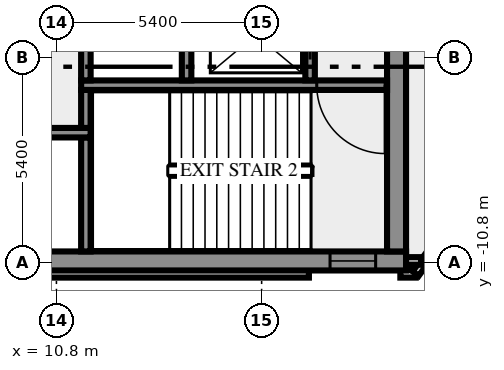
"""IFC4 building model, lengths in metres.
Left out: names, types, materials, properties, quantities, classifications, styles, units other than length and angle.
Written with IfcOpenShell. Run it as: python <this file> out.ifc"""

import sys

from ifc_helpers import new_model, si_unit, direction, frame, frame_2d, origin, place, context, subcontext, project, spatial, rectangle, extrude, element, fill, save


model = new_model("IFC4")
c1 = context("Model", 3, precision=1e-05, world=origin(), true_north=direction((0.0, 1.0)))
c2 = subcontext(c1, "Body", "Model", "MODEL_VIEW")
j1 = project(units=[si_unit("LENGTHUNIT", "METRE"), si_unit("PLANEANGLEUNIT", "RADIAN")], contexts=[c1])
p1 = place(None, origin())
s1 = spatial("IfcSite", under=j1, at=p1, CompositionType="ELEMENT")
p2 = place(p1, origin())
s2 = spatial("IfcBuilding", under=s1, at=p2, CompositionType="ELEMENT")
p3 = place(p2, frame((0.0, 0.0, 71.0)))
s3 = spatial("IfcBuildingStorey", under=s2, at=p3, CompositionType="ELEMENT", Elevation=71.0)
p4 = place(p3, frame((-17.444, -11.088, 0.0), z_axis=(0.0, 0.0, 1.0), x_axis=(1.0, 0.0, 0.0)))
e1 = element("IfcWall", 1, at=p4, inside=s3, PredefinedType="SOLIDWALL", context=c2, shape_type="SweptSolid", body=[
    extrude(rectangle(XDim=34.888, YDim=0.2, at=frame_2d((17.444, 0.0))), origin(), (0.0, 0.0, 1.0), 3.65),
])
p5 = place(p3, frame((19.85, -11.088, 0.0), z_axis=(0.0, 0.0, 1.0), x_axis=(1.0, 0.0, 0.0)))
e2 = element("IfcWall", 2, at=p5, inside=s3, PredefinedType="SOLIDWALL", context=c2, shape_type="SweptSolid", body=[
    extrude(rectangle(XDim=0.406, YDim=0.2, at=frame_2d((0.203, 0.0))), origin(), (0.0, 0.0, 1.0), 3.65),
])
p6 = place(p3, frame((20.253, -11.083, 0.0), z_axis=(0.0, 0.0, 1.0), x_axis=(0.587766567315, 0.809030569476, 0.0)))
e3 = element("IfcWall", 3, at=p6, inside=s3, PredefinedType="SOLIDWALL", context=c2, shape_type="SweptSolid", body=[
    extrude(rectangle(XDim=2.688, YDim=0.2, at=frame_2d((1.344, 0.0))), origin(), (0.0, 0.0, 1.0), 3.65),
])
p7 = place(p3, frame((19.98, -10.75, 0.0), z_axis=(0.0, 0.0, 1.0), x_axis=(1.0, 0.0, 0.0)))
e4 = element("IfcWall", 4, at=p7, inside=s3, PredefinedType="SOLIDWALL", context=c2, shape_type="SweptSolid", body=[
    extrude(rectangle(XDim=0.417, YDim=0.2, at=frame_2d((0.208, 0.0))), origin(), (0.0, 0.0, 1.0), 3.65),
])
p8 = place(p3, frame((-20.0, -10.75, 0.0), z_axis=(0.0, 0.0, 1.0), x_axis=(1.0, 0.0, 0.0)))
e5 = element("IfcWall", 5, at=p8, inside=s3, PredefinedType="SHEAR", context=c2, shape_type="SweptSolid", body=[
    extrude(rectangle(XDim=40.0, YDim=0.5, at=frame_2d((20.0, 0.0))), origin(), (0.0, 0.0, 1.0), 3.65),
])
p9 = place(p8, frame((0.8, 0.0, 1.0)))
e6 = element("IfcOpeningElement", 6, at=p9, cuts=e5, PredefinedType="OPENING", context=c2, shape_type="SweptSolid", body=[
    extrude(rectangle(XDim=1.2, YDim=1.2, at=frame_2d((0.6, 0.6))), frame((0.0, 0.26, 0.0), z_axis=(0.0, -1.0, 0.0), x_axis=(1.0, 0.0, 0.0)), (0.0, 0.0, 1.0), 0.52),
])
p10 = place(p8, frame((38.0, 0.0, 1.0)))
e7 = element("IfcOpeningElement", 7, at=p10, cuts=e5, PredefinedType="OPENING", context=c2, shape_type="SweptSolid", body=[
    extrude(rectangle(XDim=1.2, YDim=1.2, at=frame_2d((0.6, 0.6))), frame((0.0, 0.26, 0.0), z_axis=(0.0, -1.0, 0.0), x_axis=(1.0, 0.0, 0.0)), (0.0, 0.0, 1.0), 0.52),
])
p11 = place(p3, frame((11.575, -10.5, 0.0), z_axis=(0.0, 0.0, 1.0), x_axis=(0.0, 1.0, 0.0)))
e8 = element("IfcWall", 8, at=p11, inside=s3, PredefinedType="SHEAR", context=c2, shape_type="SweptSolid", body=[
    extrude(rectangle(XDim=3.0, YDim=0.25, at=frame_2d((1.5, 0.0))), origin(), (0.0, 0.0, 1.0), 3.65),
])
p12 = place(p3, frame((19.75, -10.5, 0.0), z_axis=(0.0, 0.0, 1.0), x_axis=(0.0, 1.0, 0.0)))
e9 = element("IfcWall", 9, at=p12, inside=s3, PredefinedType="SHEAR", context=c2, shape_type="SweptSolid", body=[
    extrude(rectangle(XDim=8.8, YDim=0.5, at=frame_2d((4.4, 0.0))), origin(), (0.0, 0.0, 1.0), 3.65),
])
p13 = place(p3, frame((11.7, -7.375, 0.0), z_axis=(0.0, 0.0, 1.0), x_axis=(-1.0, 0.0, 0.0)))
e10 = element("IfcWall", 10, at=p13, inside=s3, PredefinedType="SHEAR", context=c2, shape_type="SweptSolid", body=[
    extrude(rectangle(XDim=23.4, YDim=0.25, at=frame_2d((11.7, 0.0))), origin(), (0.0, 0.0, 1.0), 3.65),
])
p14 = place(p13, frame((21.45, 0.0, 0.0)))
e11 = element("IfcOpeningElement", 11, at=p14, cuts=e10, PredefinedType="OPENING", context=c2, shape_type="SweptSolid", body=[
    extrude(rectangle(XDim=1.1, YDim=2.1, at=frame_2d((0.55, 1.05))), frame((0.0, 0.135, 0.0), z_axis=(0.0, -1.0, 0.0), x_axis=(1.0, 0.0, 0.0)), (0.0, 0.0, 1.0), 0.27),
])
p15 = place(p13, frame((18.95, 0.0, 0.0)))
e12 = element("IfcOpeningElement", 12, at=p15, cuts=e10, PredefinedType="OPENING", context=c2, shape_type="SweptSolid", body=[
    extrude(rectangle(XDim=1.1, YDim=2.1, at=frame_2d((0.55, 1.05))), frame((0.0, 0.135, 0.0), z_axis=(0.0, -1.0, 0.0), x_axis=(1.0, 0.0, 0.0)), (0.0, 0.0, 1.0), 0.27),
])
p16 = place(p13, frame((16.45, 0.0, 0.0)))
e13 = element("IfcOpeningElement", 13, at=p16, cuts=e10, PredefinedType="OPENING", context=c2, shape_type="SweptSolid", body=[
    extrude(rectangle(XDim=1.1, YDim=2.1, at=frame_2d((0.55, 1.05))), frame((0.0, 0.135, 0.0), z_axis=(0.0, -1.0, 0.0), x_axis=(1.0, 0.0, 0.0)), (0.0, 0.0, 1.0), 0.27),
])
p17 = place(p13, frame((14.65, 0.0, 0.0)))
e14 = element("IfcOpeningElement", 14, at=p17, cuts=e10, PredefinedType="OPENING", context=c2, shape_type="SweptSolid", body=[
    extrude(rectangle(XDim=0.8, YDim=2.1, at=frame_2d((0.4, 1.05))), frame((0.0, 0.135, 0.0), z_axis=(0.0, -1.0, 0.0), x_axis=(1.0, 0.0, 0.0)), (0.0, 0.0, 1.0), 0.27),
])
p18 = place(p13, frame((12.8, 0.0, 0.0)))
e15 = element("IfcOpeningElement", 15, at=p18, cuts=e10, PredefinedType="OPENING", context=c2, shape_type="SweptSolid", body=[
    extrude(rectangle(XDim=0.9, YDim=2.1, at=frame_2d((0.45, 1.05))), frame((0.0, 0.135, 0.0), z_axis=(0.0, -1.0, 0.0), x_axis=(1.0, 0.0, 0.0)), (0.0, 0.0, 1.0), 0.27),
])
p19 = place(p13, frame((10.7, 0.0, 0.0)))
e16 = element("IfcOpeningElement", 16, at=p19, cuts=e10, PredefinedType="OPENING", context=c2, shape_type="SweptSolid", body=[
    extrude(rectangle(XDim=0.9, YDim=2.1, at=frame_2d((0.45, 1.05))), frame((0.0, 0.135, 0.0), z_axis=(0.0, -1.0, 0.0), x_axis=(1.0, 0.0, 0.0)), (0.0, 0.0, 1.0), 0.27),
])
p20 = place(p3, frame((11.575, -7.25, 0.0), z_axis=(0.0, 0.0, 1.0), x_axis=(0.0, 1.0, 0.0)))
e17 = element("IfcWall", 17, at=p20, inside=s3, PredefinedType="SHEAR", context=c2, shape_type="SweptSolid", body=[
    extrude(rectangle(XDim=1.0, YDim=0.25, at=frame_2d((0.5, 0.0))), origin(), (0.0, 0.0, 1.0), 3.65),
])
p21 = place(p3, frame((19.5, -6.125, 0.0), z_axis=(0.0, 0.0, 1.0), x_axis=(-1.0, 0.0, 0.0)))
e18 = element("IfcWall", 18, at=p21, inside=s3, PredefinedType="SHEAR", context=c2, shape_type="SweptSolid", body=[
    extrude(rectangle(XDim=8.05, YDim=0.25, at=frame_2d((4.025, 0.0))), origin(), (0.0, 0.0, 1.0), 3.65),
])
p22 = place(p21, frame((0.05, 0.0, 0.0)))
e19 = element("IfcOpeningElement", 19, at=p22, cuts=e18, PredefinedType="OPENING", context=c2, shape_type="SweptSolid", body=[
    extrude(rectangle(XDim=1.8, YDim=2.1, at=frame_2d((0.9, 1.05))), frame((0.0, 0.135, 0.0), z_axis=(0.0, -1.0, 0.0), x_axis=(1.0, 0.0, 0.0)), (0.0, 0.0, 1.0), 0.27),
])
for number, where, z_axis, x_axis in (
    (20, (11.575, -6.0, 0.0), (0.0, 0.0, 1.0), (0.0, 1.0, 0.0)),
    (21, (14.225, -6.0, 0.0), (0.0, 0.0, 1.0), (0.0, 1.0, 0.0)),
):
    element("IfcWall", number, at=place(p3, frame(where, z_axis=z_axis, x_axis=x_axis)), inside=s3, PredefinedType="SHEAR", context=c2, shape_type="SweptSolid", body=[
        extrude(rectangle(XDim=1.75, YDim=0.25, at=frame_2d((0.875, 0.0))), origin(), (0.0, 0.0, 1.0), 3.65),
    ])
p23 = place(p3, frame((17.475, -6.0, 0.0), z_axis=(0.0, 0.0, 1.0), x_axis=(0.0, 1.0, 0.0)))
e22 = element("IfcWall", 22, at=p23, inside=s3, PredefinedType="SHEAR", context=c2, shape_type="SweptSolid", body=[
    extrude(rectangle(XDim=4.3, YDim=0.25, at=frame_2d((2.15, 0.0))), origin(), (0.0, 0.0, 1.0), 3.65),
])
p24 = place(p23, frame((0.55, 0.0, 0.0)))
e23 = element("IfcOpeningElement", 23, at=p24, cuts=e22, PredefinedType="OPENING", context=c2, shape_type="SweptSolid", body=[
    extrude(rectangle(XDim=1.3, YDim=2.1, at=frame_2d((0.65, 1.05))), frame((0.0, 0.135, 0.0), z_axis=(0.0, -1.0, 0.0), x_axis=(1.0, 0.0, 0.0)), (0.0, 0.0, 1.0), 0.27),
])
p25 = place(p10, origin())
e24 = element("IfcWindow", 24, at=p25, inside=s3, PartitioningType="SINGLE_PANEL", PredefinedType="WINDOW", context=c2, shape_type="SweptSolid", body=[
    extrude(rectangle(XDim=1.2, YDim=1.2, at=frame_2d((0.6, 0.6))), frame((0.0, 0.03, 0.0), z_axis=(0.0, -1.0, 0.0), x_axis=(1.0, 0.0, 0.0)), (0.0, 0.0, 1.0), 0.06),
])
fill(e7, e24)
p26 = place(p22, origin())
e25 = element("IfcDoor", 25, at=p26, inside=s3, OperationType="DOUBLE_DOOR_SINGLE_SWING", PredefinedType="DOOR", context=c2, shape_type="SweptSolid", body=[
    extrude(rectangle(XDim=1.8, YDim=2.1, at=frame_2d((0.9, 1.05))), frame((0.0, 0.025, 0.0), z_axis=(0.0, -1.0, 0.0), x_axis=(1.0, 0.0, 0.0)), (0.0, 0.0, 1.0), 0.05),
])
fill(e19, e25)
p27 = place(p24, origin())
e26 = element("IfcDoor", 26, at=p27, inside=s3, OperationType="DOUBLE_DOOR_SLIDING", PredefinedType="DOOR", context=c2, shape_type="SweptSolid", body=[
    extrude(rectangle(XDim=1.3, YDim=2.1, at=frame_2d((0.65, 1.05))), frame((0.0, 0.025, 0.0), z_axis=(0.0, -1.0, 0.0), x_axis=(1.0, 0.0, 0.0)), (0.0, 0.0, 1.0), 0.05),
])
fill(e23, e26)
save(model, sys.argv[1])
